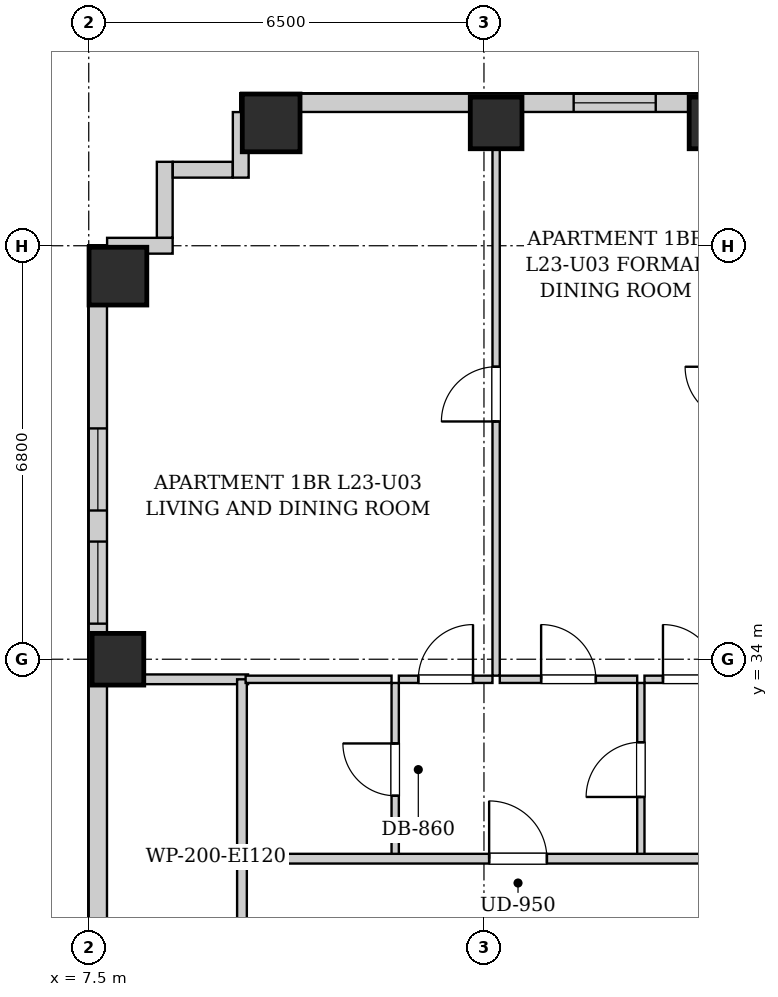
"""IFC4 building model, lengths in metres.
Left out: names, types, materials, properties, quantities, classifications, styles, units other than length and angle.
Written with IfcOpenShell. Run it as: python <this file> out.ifc"""

import sys

from ifc_helpers import new_model, si_unit, direction, frame, frame_2d, origin, origin_2d, place, context, subcontext, project, spatial, rectangle, extrude, element, fill, save


model = new_model("IFC4")
c1 = context("Model", 3, precision=1e-05, world=origin(), true_north=direction((0.0, 1.0)))
c2 = subcontext(c1, "Body", "Model", "MODEL_VIEW")
j1 = project(units=[si_unit("LENGTHUNIT", "METRE"), si_unit("PLANEANGLEUNIT", "RADIAN")], contexts=[c1])
p1 = place(None, origin())
s1 = spatial("IfcSite", under=j1, at=p1, CompositionType="ELEMENT")
p2 = place(p1, origin())
s2 = spatial("IfcBuilding", under=s1, at=p2, CompositionType="ELEMENT")
p3 = place(p2, frame((0.0, 0.0, 84.7)))
s3 = spatial("IfcBuildingStorey", under=s2, at=p3, CompositionType="ELEMENT", Elevation=84.7)
p4 = place(p3, frame((10.5, 42.82, 0.0), z_axis=(0.0, 0.0, 1.0), x_axis=(1.0, 0.0, 0.0)))
e1 = element("IfcColumn", 1, at=p4, inside=s3, PredefinedType="COLUMN", context=c2, shape_type="SweptSolid", body=[
    extrude(rectangle(XDim=0.95, YDim=0.95, at=origin_2d()), origin(), (0.0, 0.0, 1.0), 3.2),
])
for number, where, z_axis, x_axis in (
    (2, (14.2, 42.82, 0.0), (0.0, 0.0, 1.0), (1.0, 0.0, 0.0)),
    (3, (17.8, 42.82, 0.0), (0.0, 0.0, 1.0), (1.0, 0.0, 0.0)),
    (4, (7.98, 34.0, 0.0), (0.0, 0.0, 1.0), (1.0, 0.0, 0.0)),
):
    element("IfcColumn", number, at=place(p3, frame(where, z_axis=z_axis, x_axis=x_axis)), inside=s3, PredefinedType="COLUMN", context=c2, shape_type="SweptSolid", body=[
        extrude(rectangle(XDim=0.85, YDim=0.85, at=origin_2d()), origin(), (0.0, 0.0, 1.0), 3.2),
    ])
p5 = place(p3, frame((7.98, 40.3, 0.0), z_axis=(0.0, 0.0, 1.0), x_axis=(1.0, 0.0, 0.0)))
e5 = element("IfcColumn", 5, at=p5, inside=s3, PredefinedType="COLUMN", context=c2, shape_type="SweptSolid", body=[
    extrude(rectangle(XDim=0.95, YDim=0.95, at=origin_2d()), origin(), (0.0, 0.0, 1.0), 3.2),
])
p6 = place(p3, frame((10.0, 43.15, 0.0), z_axis=(0.0, 0.0, 1.0), x_axis=(1.0, 0.0, 0.0)))
e6 = element("IfcWall", 6, at=p6, inside=s3, PredefinedType="SOLIDWALL", context=c2, shape_type="SweptSolid", body=[
    extrude(rectangle(XDim=22.5, YDim=0.3, at=frame_2d((11.25, 0.0))), origin(), (0.0, 0.0, 1.0), 2.94),
])
p7 = place(p6, frame((5.475, 0.0, 0.55)))
e7 = element("IfcOpeningElement", 7, at=p7, cuts=e6, PredefinedType="OPENING", context=c2, shape_type="SweptSolid", body=[
    extrude(rectangle(XDim=1.35, YDim=1.2, at=frame_2d((0.675, 0.6))), frame((0.0, 0.16, 0.0), z_axis=(0.0, -1.0, 0.0), x_axis=(1.0, 0.0, 0.0)), (0.0, 0.0, 1.0), 0.32),
])
p8 = place(p6, frame((9.3, 0.0, 0.55)))
e8 = element("IfcOpeningElement", 8, at=p8, cuts=e6, PredefinedType="OPENING", context=c2, shape_type="SweptSolid", body=[
    extrude(rectangle(XDim=1.35, YDim=1.2, at=frame_2d((0.675, 0.6))), frame((0.0, 0.16, 0.0), z_axis=(0.0, -1.0, 0.0), x_axis=(1.0, 0.0, 0.0)), (0.0, 0.0, 1.0), 0.32),
])
p9 = place(p6, frame((18.975, 0.0, 0.55)))
e9 = element("IfcOpeningElement", 9, at=p9, cuts=e6, PredefinedType="OPENING", context=c2, shape_type="SweptSolid", body=[
    extrude(rectangle(XDim=1.35, YDim=1.2, at=frame_2d((0.675, 0.6))), frame((0.0, 0.16, 0.0), z_axis=(0.0, -1.0, 0.0), x_axis=(1.0, 0.0, 0.0)), (0.0, 0.0, 1.0), 0.32),
])
p10 = place(p6, frame((21.59, 0.0, 0.55)))
e10 = element("IfcOpeningElement", 10, at=p10, cuts=e6, PredefinedType="OPENING", context=c2, shape_type="SweptSolid", body=[
    extrude(rectangle(XDim=0.68, YDim=1.2, at=frame_2d((0.34, 0.6))), frame((0.0, 0.16, 0.0), z_axis=(0.0, -1.0, 0.0), x_axis=(1.0, 0.0, 0.0)), (0.0, 0.0, 1.0), 0.32),
])
p11 = place(p3, frame((7.65, 2.5, 0.0), z_axis=(0.0, 0.0, 1.0), x_axis=(0.0, 1.0, 0.0)))
e11 = element("IfcWall", 11, at=p11, inside=s3, PredefinedType="SOLIDWALL", context=c2, shape_type="SweptSolid", body=[
    extrude(rectangle(XDim=38.3, YDim=0.3, at=frame_2d((19.15, 0.0))), origin(), (0.0, 0.0, 1.0), 2.94),
])
p12 = place(p11, frame((3.38, 0.0, 0.55)))
e12 = element("IfcOpeningElement", 12, at=p12, cuts=e11, PredefinedType="OPENING", context=c2, shape_type="SweptSolid", body=[
    extrude(rectangle(XDim=1.35, YDim=1.2, at=frame_2d((0.675, 0.6))), frame((0.0, 0.16, 0.0), z_axis=(0.0, -1.0, 0.0), x_axis=(1.0, 0.0, 0.0)), (0.0, 0.0, 1.0), 0.32),
])
p13 = place(p11, frame((1.135, 0.0, 0.55)))
e13 = element("IfcOpeningElement", 13, at=p13, cuts=e11, PredefinedType="OPENING", context=c2, shape_type="SweptSolid", body=[
    extrude(rectangle(XDim=1.35, YDim=1.2, at=frame_2d((0.675, 0.6))), frame((0.0, 0.16, 0.0), z_axis=(0.0, -1.0, 0.0), x_axis=(1.0, 0.0, 0.0)), (0.0, 0.0, 1.0), 0.32),
])
p14 = place(p11, frame((33.946, 0.0, 0.55)))
e14 = element("IfcOpeningElement", 14, at=p14, cuts=e11, PredefinedType="OPENING", context=c2, shape_type="SweptSolid", body=[
    extrude(rectangle(XDim=1.35, YDim=1.2, at=frame_2d((0.675, 0.6))), frame((0.0, 0.16, 0.0), z_axis=(0.0, -1.0, 0.0), x_axis=(1.0, 0.0, 0.0)), (0.0, 0.0, 1.0), 0.32),
])
p15 = place(p11, frame((32.085, 0.0, 0.55)))
e15 = element("IfcOpeningElement", 15, at=p15, cuts=e11, PredefinedType="OPENING", context=c2, shape_type="SweptSolid", body=[
    extrude(rectangle(XDim=1.35, YDim=1.2, at=frame_2d((0.675, 0.6))), frame((0.0, 0.16, 0.0), z_axis=(0.0, -1.0, 0.0), x_axis=(1.0, 0.0, 0.0)), (0.0, 0.0, 1.0), 0.32),
])
p16 = place(p11, frame((14.194, 0.0, 0.55)))
e16 = element("IfcOpeningElement", 16, at=p16, cuts=e11, PredefinedType="OPENING", context=c2, shape_type="SweptSolid", body=[
    extrude(rectangle(XDim=1.35, YDim=1.2, at=frame_2d((0.675, 0.6))), frame((0.0, 0.16, 0.0), z_axis=(0.0, -1.0, 0.0), x_axis=(1.0, 0.0, 0.0)), (0.0, 0.0, 1.0), 0.32),
])
p17 = place(p11, frame((23.582, 0.0, 0.55)))
e17 = element("IfcOpeningElement", 17, at=p17, cuts=e11, PredefinedType="OPENING", context=c2, shape_type="SweptSolid", body=[
    extrude(rectangle(XDim=1.35, YDim=1.2, at=frame_2d((0.675, 0.6))), frame((0.0, 0.16, 0.0), z_axis=(0.0, -1.0, 0.0), x_axis=(1.0, 0.0, 0.0)), (0.0, 0.0, 1.0), 0.32),
])
p18 = place(p3, frame((7.802, 40.8, 0.0), z_axis=(0.0, 0.0, 1.0), x_axis=(1.0, 0.0, 0.0)))
e18 = element("IfcWall", 18, at=p18, inside=s3, PredefinedType="SOLIDWALL", context=c2, shape_type="SweptSolid", body=[
    extrude(rectangle(XDim=1.078, YDim=0.26, at=frame_2d((0.539, 0.0))), origin(), (0.0, 0.0, 1.0), 2.94),
])
p19 = place(p3, frame((8.75, 40.932, 0.0), z_axis=(0.0, 0.0, 1.0), x_axis=(0.0, 1.0, 0.0)))
e19 = element("IfcWall", 19, at=p19, inside=s3, PredefinedType="SOLIDWALL", context=c2, shape_type="SweptSolid", body=[
    extrude(rectangle(XDim=1.248, YDim=0.26, at=frame_2d((0.624, 0.0))), origin(), (0.0, 0.0, 1.0), 2.94),
])
p20 = place(p3, frame((8.882, 42.05, 0.0), z_axis=(0.0, 0.0, 1.0), x_axis=(1.0, 0.0, 0.0)))
e20 = element("IfcWall", 20, at=p20, inside=s3, PredefinedType="SOLIDWALL", context=c2, shape_type="SweptSolid", body=[
    extrude(rectangle(XDim=0.986, YDim=0.26, at=frame_2d((0.493, 0.0))), origin(), (0.0, 0.0, 1.0), 2.94),
])
p21 = place(p3, frame((10.0, 41.92, 0.0), z_axis=(0.0, 0.0, 1.0), x_axis=(0.0, 1.0, 0.0)))
e21 = element("IfcWall", 21, at=p21, inside=s3, PredefinedType="SOLIDWALL", context=c2, shape_type="SweptSolid", body=[
    extrude(rectangle(XDim=1.078, YDim=0.26, at=frame_2d((0.539, 0.0))), origin(), (0.0, 0.0, 1.0), 2.94),
])
p22 = place(p3, frame((10.02, 28.98, 0.0), z_axis=(0.0, 0.0, 1.0), x_axis=(0.0, 1.0, 0.0)))
e22 = element("IfcWall", 22, at=p22, inside=s3, PredefinedType="PARTITIONING", context=c2, shape_type="SweptSolid", body=[
    extrude(rectangle(XDim=1.74, YDim=0.16, at=frame_2d((0.87, 0.0))), origin(), (0.0, 0.0, 1.0), 2.94),
])
p23 = place(p3, frame((7.78, 33.67, 0.0), z_axis=(0.0, 0.0, 1.0), x_axis=(1.0, 0.0, 0.0)))
e23 = element("IfcWall", 23, at=p23, inside=s3, PredefinedType="PARTITIONING", context=c2, shape_type="SweptSolid", body=[
    extrude(rectangle(XDim=2.34, YDim=0.16, at=frame_2d((1.17, 0.0))), origin(), (0.0, 0.0, 1.0), 2.94),
])
p24 = place(p3, frame((10.02, 30.76, 0.0), z_axis=(0.0, 0.0, 1.0), x_axis=(0.0, 1.0, 0.0)))
e24 = element("IfcWall", 24, at=p24, inside=s3, PredefinedType="PARTITIONING", context=c2, shape_type="SweptSolid", body=[
    extrude(rectangle(XDim=2.91, YDim=0.16, at=frame_2d((1.455, 0.0))), origin(), (0.0, 0.0, 1.0), 2.94),
])
p25 = place(p3, frame((12.54, 30.76, 0.0), z_axis=(0.0, 0.0, 1.0), x_axis=(0.0, 1.0, 0.0)))
e25 = element("IfcWall", 25, at=p25, inside=s3, PredefinedType="PARTITIONING", context=c2, shape_type="SweptSolid", body=[
    extrude(rectangle(XDim=2.85, YDim=0.12, at=frame_2d((1.425, 0.0))), origin(), (0.0, 0.0, 1.0), 2.94),
])
p26 = place(p25, frame((0.995, 0.0, 0.0)))
e26 = element("IfcOpeningElement", 26, at=p26, cuts=e25, PredefinedType="OPENING", context=c2, shape_type="SweptSolid", body=[
    extrude(rectangle(XDim=0.86, YDim=2.05, at=frame_2d((0.43, 1.025))), frame((0.0, 0.07, 0.0), z_axis=(0.0, -1.0, 0.0), x_axis=(1.0, 0.0, 0.0)), (0.0, 0.0, 1.0), 0.14),
])
p27 = place(p3, frame((10.08, 33.67, 0.0), z_axis=(0.0, 0.0, 1.0), x_axis=(1.0, 0.0, 0.0)))
e27 = element("IfcWall", 27, at=p27, inside=s3, PredefinedType="PARTITIONING", context=c2, shape_type="SweptSolid", body=[
    extrude(rectangle(XDim=2.4, YDim=0.12, at=frame_2d((1.2, 0.0))), origin(), (0.0, 0.0, 1.0), 2.94),
])
p28 = place(p3, frame((16.58, 30.76, 0.0), z_axis=(0.0, 0.0, 1.0), x_axis=(0.0, 1.0, 0.0)))
e28 = element("IfcWall", 28, at=p28, inside=s3, PredefinedType="PARTITIONING", context=c2, shape_type="SweptSolid", body=[
    extrude(rectangle(XDim=2.85, YDim=0.12, at=frame_2d((1.425, 0.0))), origin(), (0.0, 0.0, 1.0), 2.94),
])
p29 = place(p28, frame((0.975, 0.0, 0.0)))
e29 = element("IfcOpeningElement", 29, at=p29, cuts=e28, PredefinedType="OPENING", context=c2, shape_type="SweptSolid", body=[
    extrude(rectangle(XDim=0.9, YDim=2.05, at=frame_2d((0.45, 1.025))), frame((0.0, 0.07, 0.0), z_axis=(0.0, -1.0, 0.0), x_axis=(1.0, 0.0, 0.0)), (0.0, 0.0, 1.0), 0.14),
])
p30 = place(p3, frame((12.6, 33.67, 0.0), z_axis=(0.0, 0.0, 1.0), x_axis=(1.0, 0.0, 0.0)))
e30 = element("IfcWall", 30, at=p30, inside=s3, PredefinedType="PARTITIONING", context=c2, shape_type="SweptSolid", body=[
    extrude(rectangle(XDim=1.54, YDim=0.12, at=frame_2d((0.77, 0.0))), origin(), (0.0, 0.0, 1.0), 2.94),
])
p31 = place(p30, frame((0.32, 0.0, 0.0)))
e31 = element("IfcOpeningElement", 31, at=p31, cuts=e30, PredefinedType="OPENING", context=c2, shape_type="SweptSolid", body=[
    extrude(rectangle(XDim=0.9, YDim=2.05, at=frame_2d((0.45, 1.025))), frame((0.0, 0.07, 0.0), z_axis=(0.0, -1.0, 0.0), x_axis=(1.0, 0.0, 0.0)), (0.0, 0.0, 1.0), 0.14),
])
p32 = place(p3, frame((14.26, 33.67, 0.0), z_axis=(0.0, 0.0, 1.0), x_axis=(1.0, 0.0, 0.0)))
e32 = element("IfcWall", 32, at=p32, inside=s3, PredefinedType="PARTITIONING", context=c2, shape_type="SweptSolid", body=[
    extrude(rectangle(XDim=2.26, YDim=0.12, at=frame_2d((1.13, 0.0))), origin(), (0.0, 0.0, 1.0), 2.94),
])
p33 = place(p32, frame((0.68, 0.0, 0.0)))
e33 = element("IfcOpeningElement", 33, at=p33, cuts=e32, PredefinedType="OPENING", context=c2, shape_type="SweptSolid", body=[
    extrude(rectangle(XDim=0.9, YDim=2.05, at=frame_2d((0.45, 1.025))), frame((0.0, 0.07, 0.0), z_axis=(0.0, -1.0, 0.0), x_axis=(1.0, 0.0, 0.0)), (0.0, 0.0, 1.0), 0.14),
])
p34 = place(p3, frame((16.64, 33.67, 0.0), z_axis=(0.0, 0.0, 1.0), x_axis=(1.0, 0.0, 0.0)))
e34 = element("IfcWall", 34, at=p34, inside=s3, PredefinedType="PARTITIONING", context=c2, shape_type="SweptSolid", body=[
    extrude(rectangle(XDim=1.508, YDim=0.12, at=frame_2d((0.754, 0.0))), origin(), (0.0, 0.0, 1.0), 2.94),
])
p35 = place(p34, frame((0.304, 0.0, 0.0)))
e35 = element("IfcOpeningElement", 35, at=p35, cuts=e34, PredefinedType="OPENING", context=c2, shape_type="SweptSolid", body=[
    extrude(rectangle(XDim=0.9, YDim=2.05, at=frame_2d((0.45, 1.025))), frame((0.0, 0.07, 0.0), z_axis=(0.0, -1.0, 0.0), x_axis=(1.0, 0.0, 0.0)), (0.0, 0.0, 1.0), 0.14),
])
p36 = place(p3, frame((14.2, 33.73, 0.0), z_axis=(0.0, 0.0, 1.0), x_axis=(0.0, 1.0, 0.0)))
e36 = element("IfcWall", 36, at=p36, inside=s3, PredefinedType="PARTITIONING", context=c2, shape_type="SweptSolid", body=[
    extrude(rectangle(XDim=9.29, YDim=0.12, at=frame_2d((4.645, 0.0))), origin(), (0.0, 0.0, 1.0), 2.94),
])
p37 = place(p36, frame((4.18, 0.0, 0.0)))
e37 = element("IfcOpeningElement", 37, at=p37, cuts=e36, PredefinedType="OPENING", context=c2, shape_type="SweptSolid", body=[
    extrude(rectangle(XDim=0.9, YDim=2.05, at=frame_2d((0.45, 1.025))), frame((0.0, 0.07, 0.0), z_axis=(0.0, -1.0, 0.0), x_axis=(1.0, 0.0, 0.0)), (0.0, 0.0, 1.0), 0.14),
])
p38 = place(p3, frame((10.05, 30.72, 0.0), z_axis=(0.0, 0.0, 1.0), x_axis=(1.0, 0.0, 0.0)))
e38 = element("IfcWall", 38, at=p38, inside=s3, PredefinedType="PARTITIONING", context=c2, shape_type="SweptSolid", body=[
    extrude(rectangle(XDim=30.8, YDim=0.16, at=frame_2d((15.4, 0.0))), origin(), (0.0, 0.0, 1.0), 2.94),
])
p39 = place(p38, frame((4.035, 0.0, 0.0)))
e39 = element("IfcOpeningElement", 39, at=p39, cuts=e38, PredefinedType="OPENING", context=c2, shape_type="SweptSolid", body=[
    extrude(rectangle(XDim=0.95, YDim=2.1, at=frame_2d((0.475, 1.05))), frame((0.0, 0.09, 0.0), z_axis=(0.0, -1.0, 0.0), x_axis=(1.0, 0.0, 0.0)), (0.0, 0.0, 1.0), 0.18),
])
p40 = place(p38, frame((25.175, 0.0, 0.0)))
e40 = element("IfcOpeningElement", 40, at=p40, cuts=e38, PredefinedType="OPENING", context=c2, shape_type="SweptSolid", body=[
    extrude(rectangle(XDim=0.95, YDim=2.1, at=frame_2d((0.475, 1.05))), frame((0.0, 0.09, 0.0), z_axis=(0.0, -1.0, 0.0), x_axis=(1.0, 0.0, 0.0)), (0.0, 0.0, 1.0), 0.18),
])
p41 = place(p26, origin())
e41 = element("IfcDoor", 41, at=p41, inside=s3, OperationType="SINGLE_SWING_RIGHT", PredefinedType="DOOR", context=c2, shape_type="SweptSolid", body=[
    extrude(rectangle(XDim=0.86, YDim=2.05, at=frame_2d((0.43, 1.025))), frame((0.0, 0.025, 0.0), z_axis=(0.0, -1.0, 0.0), x_axis=(1.0, 0.0, 0.0)), (0.0, 0.0, 1.0), 0.05),
])
fill(e26, e41)
p42 = place(p29, origin())
e42 = element("IfcDoor", 42, at=p42, inside=s3, OperationType="SINGLE_SWING_LEFT", PredefinedType="DOOR", context=c2, shape_type="SweptSolid", body=[
    extrude(rectangle(XDim=0.9, YDim=2.05, at=frame_2d((0.45, 1.025))), frame((0.0, 0.025, 0.0), z_axis=(0.0, -1.0, 0.0), x_axis=(1.0, 0.0, 0.0)), (0.0, 0.0, 1.0), 0.05),
])
fill(e29, e42)
p43 = place(p31, origin())
e43 = element("IfcDoor", 43, at=p43, inside=s3, OperationType="SINGLE_SWING_RIGHT", PredefinedType="DOOR", context=c2, shape_type="SweptSolid", body=[
    extrude(rectangle(XDim=0.9, YDim=2.05, at=frame_2d((0.45, 1.025))), frame((0.0, 0.025, 0.0), z_axis=(0.0, -1.0, 0.0), x_axis=(1.0, 0.0, 0.0)), (0.0, 0.0, 1.0), 0.05),
])
fill(e31, e43)
p44 = place(p33, origin())
e44 = element("IfcDoor", 44, at=p44, inside=s3, OperationType="SINGLE_SWING_LEFT", PredefinedType="DOOR", context=c2, shape_type="SweptSolid", body=[
    extrude(rectangle(XDim=0.9, YDim=2.05, at=frame_2d((0.45, 1.025))), frame((0.0, 0.025, 0.0), z_axis=(0.0, -1.0, 0.0), x_axis=(1.0, 0.0, 0.0)), (0.0, 0.0, 1.0), 0.05),
])
fill(e33, e44)
p45 = place(p35, origin())
e45 = element("IfcDoor", 45, at=p45, inside=s3, OperationType="SINGLE_SWING_LEFT", PredefinedType="DOOR", context=c2, shape_type="SweptSolid", body=[
    extrude(rectangle(XDim=0.9, YDim=2.05, at=frame_2d((0.45, 1.025))), frame((0.0, 0.025, 0.0), z_axis=(0.0, -1.0, 0.0), x_axis=(1.0, 0.0, 0.0)), (0.0, 0.0, 1.0), 0.05),
])
fill(e35, e45)
p46 = place(p37, origin())
e46 = element("IfcDoor", 46, at=p46, inside=s3, OperationType="SINGLE_SWING_LEFT", PredefinedType="DOOR", context=c2, shape_type="SweptSolid", body=[
    extrude(rectangle(XDim=0.9, YDim=2.05, at=frame_2d((0.45, 1.025))), frame((0.0, 0.025, 0.0), z_axis=(0.0, -1.0, 0.0), x_axis=(1.0, 0.0, 0.0)), (0.0, 0.0, 1.0), 0.05),
])
fill(e37, e46)
p47 = place(p39, origin())
e47 = element("IfcDoor", 47, at=p47, inside=s3, OperationType="SINGLE_SWING_LEFT", PredefinedType="DOOR", context=c2, shape_type="SweptSolid", body=[
    extrude(rectangle(XDim=0.95, YDim=2.1, at=frame_2d((0.475, 1.05))), frame((0.0, 0.025, 0.0), z_axis=(0.0, -1.0, 0.0), x_axis=(1.0, 0.0, 0.0)), (0.0, 0.0, 1.0), 0.05),
])
fill(e39, e47)
p48 = place(p14, origin())
e48 = element("IfcWindow", 48, at=p48, inside=s3, PartitioningType="SINGLE_PANEL", PredefinedType="WINDOW", context=c2, shape_type="SweptSolid", body=[
    extrude(rectangle(XDim=1.35, YDim=1.2, at=frame_2d((0.675, 0.6))), frame((0.0, 0.03, 0.0), z_axis=(0.0, -1.0, 0.0), x_axis=(1.0, 0.0, 0.0)), (0.0, 0.0, 1.0), 0.06),
])
fill(e14, e48)
p49 = place(p15, origin())
e49 = element("IfcWindow", 49, at=p49, inside=s3, PartitioningType="SINGLE_PANEL", PredefinedType="WINDOW", context=c2, shape_type="SweptSolid", body=[
    extrude(rectangle(XDim=1.35, YDim=1.2, at=frame_2d((0.675, 0.6))), frame((0.0, 0.03, 0.0), z_axis=(0.0, -1.0, 0.0), x_axis=(1.0, 0.0, 0.0)), (0.0, 0.0, 1.0), 0.06),
])
fill(e15, e49)
p50 = place(p7, origin())
e50 = element("IfcWindow", 50, at=p50, inside=s3, PartitioningType="SINGLE_PANEL", PredefinedType="WINDOW", context=c2, shape_type="SweptSolid", body=[
    extrude(rectangle(XDim=1.35, YDim=1.2, at=frame_2d((0.675, 0.6))), frame((0.0, 0.03, 0.0), z_axis=(0.0, -1.0, 0.0), x_axis=(1.0, 0.0, 0.0)), (0.0, 0.0, 1.0), 0.06),
])
fill(e7, e50)
save(model, sys.argv[1])
